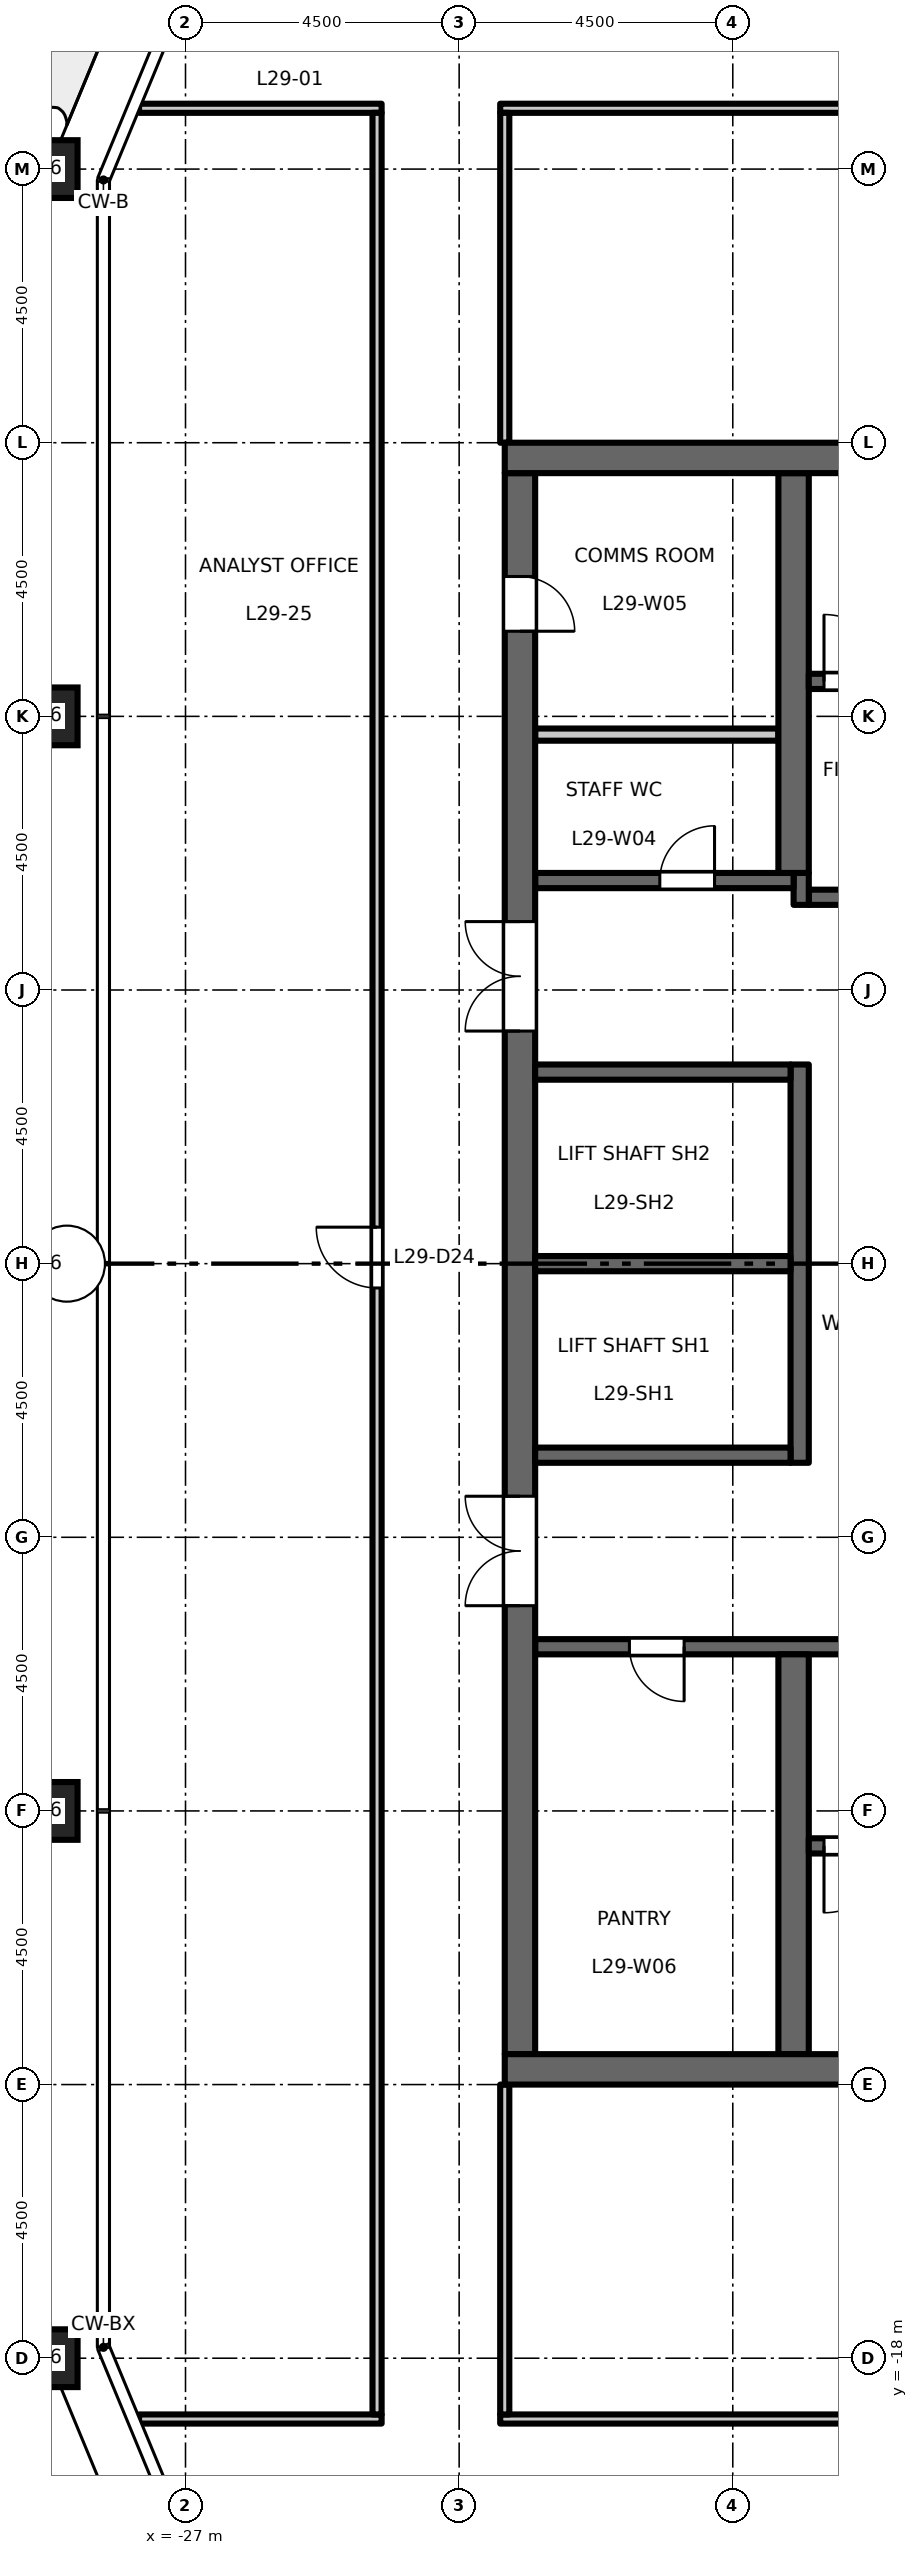
"""IFC4 building model, lengths in metres.
Left out: names, types, materials, properties, quantities, classifications, styles, units other than length and angle.
Written with IfcOpenShell. Run it as: python <this file> out.ifc"""

import sys

from ifc_helpers import new_model, si_unit, direction, frame, frame_2d, origin, origin_2d, place, context, subcontext, project, spatial, rectangle, hollow_rectangle, extrude, element, fill, save


model = new_model("IFC4")
c1 = context("Model", 3, precision=1e-05, world=origin(), true_north=direction((0.0, 1.0)))
c2 = subcontext(c1, "Body", "Model", "MODEL_VIEW")
j1 = project(units=[si_unit("LENGTHUNIT", "METRE"), si_unit("PLANEANGLEUNIT", "RADIAN")], contexts=[c1])
p1 = place(None, origin())
s1 = spatial("IfcSite", under=j1, at=p1, CompositionType="ELEMENT")
p2 = place(p1, origin())
s2 = spatial("IfcBuilding", under=s1, at=p2, CompositionType="ELEMENT")
p3 = place(p2, frame((0.0, 0.0, 136.2)))
s3 = spatial("IfcBuildingStorey", under=s2, at=p3, CompositionType="ELEMENT", Elevation=136.2)
for number, where, z_axis, x_axis in (
    (1, (-29.25, 18.0, 0.0), (0.0, 0.0, 1.0), (1.0, 0.0, 0.0)),
    (2, (-29.25, 9.0, 0.0), (0.0, 0.0, 1.0), (1.0, 0.0, 0.0)),
    (3, (-29.25, 0.0, 0.0), (0.0, 0.0, 1.0), (1.0, 0.0, 0.0)),
    (4, (-29.25, -9.0, 0.0), (0.0, 0.0, 1.0), (1.0, 0.0, 0.0)),
    (5, (-29.25, -18.0, 0.0), (0.0, 0.0, 1.0), (1.0, 0.0, 0.0)),
):
    element("IfcColumn", number, at=place(p3, frame(where, z_axis=z_axis, x_axis=x_axis)), inside=s3, PredefinedType="COLUMN", context=c2, shape_type="SweptSolid", body=[
        extrude(hollow_rectangle(XDim=0.95, YDim=0.95, WallThickness=0.055, at=origin_2d()), origin(), (0.0, 0.0, 1.0), 4.5),
    ])
p4 = place(p3, frame((-12.15, 6.025, 0.0), z_axis=(0.0, 0.0, 1.0), x_axis=(-1.0, 0.0, 0.0)))
e6 = element("IfcWall", 6, at=p4, inside=s3, PredefinedType="SHEAR", context=c2, shape_type="SweptSolid", body=[
    extrude(rectangle(XDim=4.6, YDim=0.25, at=frame_2d((2.3, 0.0))), origin(), (0.0, 0.0, 1.0), 4.35),
])
p5 = place(p4, frame((1.8, 0.0, 0.0)))
e7 = element("IfcOpeningElement", 7, at=p5, cuts=e6, PredefinedType="OPENING", context=c2, shape_type="SweptSolid", body=[
    extrude(rectangle(XDim=1.0, YDim=2.1, at=frame_2d((0.5, 1.05))), frame((0.0, 0.135, 0.0), z_axis=(0.0, -1.0, 0.0), x_axis=(1.0, 0.0, 0.0)), (0.0, 0.0, 1.0), 0.27),
])
p6 = place(p3, frame((-16.875, 5.9, 0.0), z_axis=(0.0, 0.0, 1.0), x_axis=(0.0, 1.0, 0.0)))
e8 = element("IfcWall", 8, at=p6, inside=s3, PredefinedType="SHEAR", context=c2, shape_type="SweptSolid", body=[
    extrude(rectangle(XDim=0.525, YDim=0.25, at=frame_2d((0.263, 0.0))), origin(), (0.0, 0.0, 1.0), 4.35),
])
p7 = place(p3, frame((-17.0, 6.3, 0.0), z_axis=(0.0, 0.0, 1.0), x_axis=(-1.0, 0.0, 0.0)))
e9 = element("IfcWall", 9, at=p7, inside=s3, PredefinedType="SHEAR", context=c2, shape_type="SweptSolid", body=[
    extrude(rectangle(XDim=4.25, YDim=0.25, at=frame_2d((2.125, 0.0))), origin(), (0.0, 0.0, 1.0), 4.35),
])
p8 = place(p7, frame((1.3, 0.0, 0.0)))
e10 = element("IfcOpeningElement", 10, at=p8, cuts=e9, PredefinedType="OPENING", context=c2, shape_type="SweptSolid", body=[
    extrude(rectangle(XDim=0.9, YDim=2.1, at=frame_2d((0.45, 1.05))), frame((0.0, 0.135, 0.0), z_axis=(0.0, -1.0, 0.0), x_axis=(1.0, 0.0, 0.0)), (0.0, 0.0, 1.0), 0.27),
])
p9 = place(p3, frame((-12.15, -6.3, 0.0), z_axis=(0.0, 0.0, 1.0), x_axis=(-1.0, 0.0, 0.0)))
e11 = element("IfcWall", 11, at=p9, inside=s3, PredefinedType="SHEAR", context=c2, shape_type="SweptSolid", body=[
    extrude(rectangle(XDim=9.1, YDim=0.25, at=frame_2d((4.55, 0.0))), origin(), (0.0, 0.0, 1.0), 4.35),
])
p10 = place(p9, frame((1.8, 0.0, 0.0)))
e12 = element("IfcOpeningElement", 12, at=p10, cuts=e11, PredefinedType="OPENING", context=c2, shape_type="SweptSolid", body=[
    extrude(rectangle(XDim=1.0, YDim=2.1, at=frame_2d((0.5, 1.05))), frame((0.0, 0.135, 0.0), z_axis=(0.0, -1.0, 0.0), x_axis=(1.0, 0.0, 0.0)), (0.0, 0.0, 1.0), 0.27),
])
p11 = place(p9, frame((6.65, 0.0, 0.0)))
e13 = element("IfcOpeningElement", 13, at=p11, cuts=e11, PredefinedType="OPENING", context=c2, shape_type="SweptSolid", body=[
    extrude(rectangle(XDim=0.9, YDim=2.1, at=frame_2d((0.45, 1.05))), frame((0.0, 0.135, 0.0), z_axis=(0.0, -1.0, 0.0), x_axis=(1.0, 0.0, 0.0)), (0.0, 0.0, 1.0), 0.27),
])
p12 = place(p3, frame((-21.5, -13.0, 0.0), z_axis=(0.0, 0.0, 1.0), x_axis=(0.0, 1.0, 0.0)))
e14 = element("IfcWall", 14, at=p12, inside=s3, PredefinedType="SHEAR", context=c2, shape_type="SweptSolid", body=[
    extrude(rectangle(XDim=26.0, YDim=0.5, at=frame_2d((13.0, 0.0))), origin(), (0.0, 0.0, 1.0), 4.35),
])
p13 = place(p12, frame((16.825, 0.0, 0.0)))
e15 = element("IfcOpeningElement", 15, at=p13, cuts=e14, PredefinedType="OPENING", context=c2, shape_type="SweptSolid", body=[
    extrude(rectangle(XDim=1.8, YDim=2.1, at=frame_2d((0.9, 1.05))), frame((0.0, 0.26, 0.0), z_axis=(0.0, -1.0, 0.0), x_axis=(1.0, 0.0, 0.0)), (0.0, 0.0, 1.0), 0.52),
])
p14 = place(p12, frame((7.375, 0.0, 0.0)))
e16 = element("IfcOpeningElement", 16, at=p14, cuts=e14, PredefinedType="OPENING", context=c2, shape_type="SweptSolid", body=[
    extrude(rectangle(XDim=1.8, YDim=2.1, at=frame_2d((0.9, 1.05))), frame((0.0, 0.26, 0.0), z_axis=(0.0, -1.0, 0.0), x_axis=(1.0, 0.0, 0.0)), (0.0, 0.0, 1.0), 0.52),
])
p15 = place(p12, frame((23.4, 0.0, 0.0)))
e17 = element("IfcOpeningElement", 17, at=p15, cuts=e14, PredefinedType="OPENING", context=c2, shape_type="SweptSolid", body=[
    extrude(rectangle(XDim=0.9, YDim=2.1, at=frame_2d((0.45, 1.05))), frame((0.0, 0.26, 0.0), z_axis=(0.0, -1.0, 0.0), x_axis=(1.0, 0.0, 0.0)), (0.0, 0.0, 1.0), 0.52),
])
p16 = place(p3, frame((-17.25, 8.7, 0.0), z_axis=(0.0, 0.0, 1.0), x_axis=(-1.0, 0.0, 0.0)))
e18 = element("IfcWall", 18, at=p16, inside=s3, PredefinedType="PARTITIONING", context=c2, shape_type="SweptSolid", body=[
    extrude(rectangle(XDim=4.0, YDim=0.2, at=frame_2d((2.0, 0.0))), origin(), (0.0, 0.0, 1.0), 4.35),
])
p17 = place(p3, frame((-16.9, -3.275, 0.0), z_axis=(0.0, 0.0, 1.0), x_axis=(0.0, 1.0, 0.0)))
e19 = element("IfcWall", 19, at=p17, inside=s3, PredefinedType="SHEAR", context=c2, shape_type="SweptSolid", body=[
    extrude(rectangle(XDim=6.55, YDim=0.3, at=frame_2d((3.275, 0.0))), origin(), (0.0, 0.0, 1.0), 4.35),
])
for number, where, z_axis, x_axis in (
    (20, (-17.05, 0.0, 0.0), (0.0, 0.0, 1.0), (-1.0, 0.0, 0.0)),
    (21, (-17.05, 3.15, 0.0), (0.0, 0.0, 1.0), (-1.0, 0.0, 0.0)),
    (22, (-17.05, -3.15, 0.0), (0.0, 0.0, 1.0), (-1.0, 0.0, 0.0)),
):
    element("IfcWall", number, at=place(p3, frame(where, z_axis=z_axis, x_axis=x_axis)), inside=s3, PredefinedType="SHEAR", context=c2, shape_type="SweptSolid", body=[
        extrude(rectangle(XDim=4.2, YDim=0.25, at=frame_2d((2.1, 0.0))), origin(), (0.0, 0.0, 1.0), 4.35),
    ])
for number, where, z_axis, x_axis in (
    (23, (-17.0, 6.425, 0.0), (0.0, 0.0, 1.0), (0.0, 1.0, 0.0)),
    (24, (-17.0, -13.0, 0.0), (0.0, 0.0, 1.0), (0.0, 1.0, 0.0)),
):
    element("IfcWall", number, at=place(p3, frame(where, z_axis=z_axis, x_axis=x_axis)), inside=s3, PredefinedType="SHEAR", context=c2, shape_type="SweptSolid", body=[
        extrude(rectangle(XDim=6.575, YDim=0.5, at=frame_2d((3.288, 0.0))), origin(), (0.0, 0.0, 1.0), 4.35),
    ])
p18 = place(p3, frame((-8.75, 9.575, 0.0), z_axis=(0.0, 0.0, 1.0), x_axis=(-1.0, 0.0, 0.0)))
e25 = element("IfcWall", 25, at=p18, inside=s3, PredefinedType="SHEAR", context=c2, shape_type="SweptSolid", body=[
    extrude(rectangle(XDim=8.0, YDim=0.25, at=frame_2d((4.0, 0.0))), origin(), (0.0, 0.0, 1.0), 4.35),
])
p19 = place(p18, frame((6.65, 0.0, 0.0)))
e26 = element("IfcOpeningElement", 26, at=p19, cuts=e25, PredefinedType="OPENING", context=c2, shape_type="SweptSolid", body=[
    extrude(rectangle(XDim=1.1, YDim=2.1, at=frame_2d((0.55, 1.05))), frame((0.0, 0.135, 0.0), z_axis=(0.0, -1.0, 0.0), x_axis=(1.0, 0.0, 0.0)), (0.0, 0.0, 1.0), 0.27),
])
p20 = place(p3, frame((-8.75, -9.575, 0.0), z_axis=(0.0, 0.0, 1.0), x_axis=(-1.0, 0.0, 0.0)))
e27 = element("IfcWall", 27, at=p20, inside=s3, PredefinedType="SHEAR", context=c2, shape_type="SweptSolid", body=[
    extrude(rectangle(XDim=8.0, YDim=0.25, at=frame_2d((4.0, 0.0))), origin(), (0.0, 0.0, 1.0), 4.35),
])
p21 = place(p20, frame((6.65, 0.0, 0.0)))
e28 = element("IfcOpeningElement", 28, at=p21, cuts=e27, PredefinedType="OPENING", context=c2, shape_type="SweptSolid", body=[
    extrude(rectangle(XDim=1.1, YDim=2.1, at=frame_2d((0.55, 1.05))), frame((0.0, 0.135, 0.0), z_axis=(0.0, -1.0, 0.0), x_axis=(1.0, 0.0, 0.0)), (0.0, 0.0, 1.0), 0.27),
])
for number, where, z_axis, x_axis in (
    (29, (-8.25, 13.25, 0.0), (0.0, 0.0, 1.0), (-1.0, 0.0, 0.0)),
    (30, (-8.25, -13.25, 0.0), (0.0, 0.0, 1.0), (-1.0, 0.0, 0.0)),
):
    element("IfcWall", number, at=place(p3, frame(where, z_axis=z_axis, x_axis=x_axis)), inside=s3, PredefinedType="SHEAR", context=c2, shape_type="SweptSolid", body=[
        extrude(rectangle(XDim=13.5, YDim=0.5, at=frame_2d((6.75, 0.0))), origin(), (0.0, 0.0, 1.0), 4.35),
    ])
p22 = place(p3, frame((-27.764, -19.0, 0.0), z_axis=(0.0, 0.0, 1.0), x_axis=(1.0, 0.0, 0.0)))
e31 = element("IfcWall", 31, at=p22, inside=s3, PredefinedType="PARTITIONING", context=c2, shape_type="SweptSolid", body=[
    extrude(rectangle(XDim=3.989, YDim=0.15, at=frame_2d((1.995, 0.0))), origin(), (0.0, 0.0, 1.0), 4.35),
])
p23 = place(p3, frame((-21.825, -19.0, 0.0), z_axis=(0.0, 0.0, 1.0), x_axis=(1.0, 0.0, 0.0)))
e32 = element("IfcWall", 32, at=p23, inside=s3, PredefinedType="PARTITIONING", context=c2, shape_type="SweptSolid", body=[
    extrude(rectangle(XDim=43.65, YDim=0.15, at=frame_2d((21.825, 0.0))), origin(), (0.0, 0.0, 1.0), 4.35),
])
p24 = place(p23, frame((21.425, 0.0, 0.0)))
e33 = element("IfcOpeningElement", 33, at=p24, cuts=e32, PredefinedType="OPENING", context=c2, shape_type="SweptSolid", body=[
    extrude(rectangle(XDim=1.0, YDim=2.1, at=frame_2d((0.5, 1.05))), frame((0.0, 0.085, 0.0), z_axis=(0.0, -1.0, 0.0), x_axis=(1.0, 0.0, 0.0)), (0.0, 0.0, 1.0), 0.17),
])
p25 = place(p23, frame((6.425, 0.0, 0.0)))
e34 = element("IfcOpeningElement", 34, at=p25, cuts=e32, PredefinedType="OPENING", context=c2, shape_type="SweptSolid", body=[
    extrude(rectangle(XDim=1.0, YDim=2.1, at=frame_2d((0.5, 1.05))), frame((0.0, 0.085, 0.0), z_axis=(0.0, -1.0, 0.0), x_axis=(1.0, 0.0, 0.0)), (0.0, 0.0, 1.0), 0.17),
])
p26 = place(p23, frame((36.425, 0.0, 0.0)))
e35 = element("IfcOpeningElement", 35, at=p26, cuts=e32, PredefinedType="OPENING", context=c2, shape_type="SweptSolid", body=[
    extrude(rectangle(XDim=1.0, YDim=2.1, at=frame_2d((0.5, 1.05))), frame((0.0, 0.085, 0.0), z_axis=(0.0, -1.0, 0.0), x_axis=(1.0, 0.0, 0.0)), (0.0, 0.0, 1.0), 0.17),
])
p27 = place(p3, frame((-27.764, 19.0, 0.0), z_axis=(0.0, 0.0, 1.0), x_axis=(1.0, 0.0, 0.0)))
e36 = element("IfcWall", 36, at=p27, inside=s3, PredefinedType="PARTITIONING", context=c2, shape_type="SweptSolid", body=[
    extrude(rectangle(XDim=3.989, YDim=0.15, at=frame_2d((1.995, 0.0))), origin(), (0.0, 0.0, 1.0), 4.35),
])
p28 = place(p3, frame((-21.825, 19.0, 0.0), z_axis=(0.0, 0.0, 1.0), x_axis=(1.0, 0.0, 0.0)))
e37 = element("IfcWall", 37, at=p28, inside=s3, PredefinedType="PARTITIONING", context=c2, shape_type="SweptSolid", body=[
    extrude(rectangle(XDim=43.65, YDim=0.15, at=frame_2d((21.825, 0.0))), origin(), (0.0, 0.0, 1.0), 4.35),
])
p29 = place(p28, frame((17.225, 0.0, 0.0)))
e38 = element("IfcOpeningElement", 38, at=p29, cuts=e37, PredefinedType="OPENING", context=c2, shape_type="SweptSolid", body=[
    extrude(rectangle(XDim=1.0, YDim=2.1, at=frame_2d((0.5, 1.05))), frame((0.0, 0.085, 0.0), z_axis=(0.0, -1.0, 0.0), x_axis=(1.0, 0.0, 0.0)), (0.0, 0.0, 1.0), 0.17),
])
p30 = place(p28, frame((25.475, 0.0, 0.0)))
e39 = element("IfcOpeningElement", 39, at=p30, cuts=e37, PredefinedType="OPENING", context=c2, shape_type="SweptSolid", body=[
    extrude(rectangle(XDim=1.0, YDim=2.1, at=frame_2d((0.5, 1.05))), frame((0.0, 0.085, 0.0), z_axis=(0.0, -1.0, 0.0), x_axis=(1.0, 0.0, 0.0)), (0.0, 0.0, 1.0), 0.17),
])
p31 = place(p28, frame((6.225, 0.0, 0.0)))
e40 = element("IfcOpeningElement", 40, at=p31, cuts=e37, PredefinedType="OPENING", context=c2, shape_type="SweptSolid", body=[
    extrude(rectangle(XDim=1.0, YDim=2.1, at=frame_2d((0.5, 1.05))), frame((0.0, 0.085, 0.0), z_axis=(0.0, -1.0, 0.0), x_axis=(1.0, 0.0, 0.0)), (0.0, 0.0, 1.0), 0.17),
])
p32 = place(p28, frame((36.225, 0.0, 0.0)))
e41 = element("IfcOpeningElement", 41, at=p32, cuts=e37, PredefinedType="OPENING", context=c2, shape_type="SweptSolid", body=[
    extrude(rectangle(XDim=1.0, YDim=2.1, at=frame_2d((0.5, 1.05))), frame((0.0, 0.085, 0.0), z_axis=(0.0, -1.0, 0.0), x_axis=(1.0, 0.0, 0.0)), (0.0, 0.0, 1.0), 0.17),
])
p33 = place(p3, frame((-23.85, -18.925, 0.0), z_axis=(0.0, 0.0, 1.0), x_axis=(0.0, 1.0, 0.0)))
e42 = element("IfcWall", 42, at=p33, inside=s3, PredefinedType="PARTITIONING", context=c2, shape_type="SweptSolid", body=[
    extrude(rectangle(XDim=37.85, YDim=0.15, at=frame_2d((18.925, 0.0))), origin(), (0.0, 0.0, 1.0), 4.35),
])
p34 = place(p33, frame((18.525, 0.0, 0.0)))
e43 = element("IfcOpeningElement", 43, at=p34, cuts=e42, PredefinedType="OPENING", context=c2, shape_type="SweptSolid", body=[
    extrude(rectangle(XDim=1.0, YDim=2.1, at=frame_2d((0.5, 1.05))), frame((0.0, 0.085, 0.0), z_axis=(0.0, -1.0, 0.0), x_axis=(1.0, 0.0, 0.0)), (0.0, 0.0, 1.0), 0.17),
])
for number, where, z_axis, x_axis in (
    (44, (-21.75, -18.925, 0.0), (0.0, 0.0, 1.0), (0.0, 1.0, 0.0)),
    (45, (-21.75, 13.5, 0.0), (0.0, 0.0, 1.0), (0.0, 1.0, 0.0)),
):
    element("IfcWall", number, at=place(p3, frame(where, z_axis=z_axis, x_axis=x_axis)), inside=s3, PredefinedType="PARTITIONING", context=c2, shape_type="SweptSolid", body=[
        extrude(rectangle(XDim=5.425, YDim=0.15, at=frame_2d((2.712, 0.0))), origin(), (0.0, 0.0, 1.0), 4.35),
    ])
p35 = place(p19, origin())
e46 = element("IfcDoor", 46, at=p35, inside=s3, OperationType="SINGLE_SWING_RIGHT", PredefinedType="DOOR", context=c2, shape_type="SweptSolid", body=[
    extrude(rectangle(XDim=1.1, YDim=2.1, at=frame_2d((0.55, 1.05))), frame((0.0, 0.025, 0.0), z_axis=(0.0, -1.0, 0.0), x_axis=(1.0, 0.0, 0.0)), (0.0, 0.0, 1.0), 0.05),
])
fill(e26, e46)
p36 = place(p21, origin())
e47 = element("IfcDoor", 47, at=p36, inside=s3, OperationType="SINGLE_SWING_LEFT", PredefinedType="DOOR", context=c2, shape_type="SweptSolid", body=[
    extrude(rectangle(XDim=1.1, YDim=2.1, at=frame_2d((0.55, 1.05))), frame((0.0, 0.025, 0.0), z_axis=(0.0, -1.0, 0.0), x_axis=(1.0, 0.0, 0.0)), (0.0, 0.0, 1.0), 0.05),
])
fill(e28, e47)
p37 = place(p13, origin())
e48 = element("IfcDoor", 48, at=p37, inside=s3, OperationType="DOUBLE_DOOR_DOUBLE_SWING", PredefinedType="DOOR", context=c2, shape_type="SweptSolid", body=[
    extrude(rectangle(XDim=1.8, YDim=2.1, at=frame_2d((0.9, 1.05))), frame((0.0, 0.025, 0.0), z_axis=(0.0, -1.0, 0.0), x_axis=(1.0, 0.0, 0.0)), (0.0, 0.0, 1.0), 0.05),
])
fill(e15, e48)
p38 = place(p14, origin())
e49 = element("IfcDoor", 49, at=p38, inside=s3, OperationType="DOUBLE_DOOR_DOUBLE_SWING", PredefinedType="DOOR", context=c2, shape_type="SweptSolid", body=[
    extrude(rectangle(XDim=1.8, YDim=2.1, at=frame_2d((0.9, 1.05))), frame((0.0, 0.025, 0.0), z_axis=(0.0, -1.0, 0.0), x_axis=(1.0, 0.0, 0.0)), (0.0, 0.0, 1.0), 0.05),
])
fill(e16, e49)
p39 = place(p8, origin())
e50 = element("IfcDoor", 50, at=p39, inside=s3, OperationType="SINGLE_SWING_LEFT", PredefinedType="DOOR", context=c2, shape_type="SweptSolid", body=[
    extrude(rectangle(XDim=0.9, YDim=2.1, at=frame_2d((0.45, 1.05))), frame((0.0, 0.025, 0.0), z_axis=(0.0, -1.0, 0.0), x_axis=(1.0, 0.0, 0.0)), (0.0, 0.0, 1.0), 0.05),
])
fill(e10, e50)
p40 = place(p15, origin())
e51 = element("IfcDoor", 51, at=p40, inside=s3, OperationType="SINGLE_SWING_LEFT", PredefinedType="DOOR", context=c2, shape_type="SweptSolid", body=[
    extrude(rectangle(XDim=0.9, YDim=2.1, at=frame_2d((0.45, 1.05))), frame((0.0, 0.025, 0.0), z_axis=(0.0, -1.0, 0.0), x_axis=(1.0, 0.0, 0.0)), (0.0, 0.0, 1.0), 0.05),
])
fill(e17, e51)
p41 = place(p11, origin())
e52 = element("IfcDoor", 52, at=p41, inside=s3, OperationType="SINGLE_SWING_RIGHT", PredefinedType="DOOR", context=c2, shape_type="SweptSolid", body=[
    extrude(rectangle(XDim=0.9, YDim=2.1, at=frame_2d((0.45, 1.05))), frame((0.0, 0.025, 0.0), z_axis=(0.0, -1.0, 0.0), x_axis=(1.0, 0.0, 0.0)), (0.0, 0.0, 1.0), 0.05),
])
fill(e13, e52)
p42 = place(p34, origin())
e53 = element("IfcDoor", 53, at=p42, inside=s3, OperationType="SINGLE_SWING_RIGHT", PredefinedType="DOOR", context=c2, shape_type="SweptSolid", body=[
    extrude(rectangle(XDim=1.0, YDim=2.1, at=frame_2d((0.5, 1.05))), frame((0.0, 0.025, 0.0), z_axis=(0.0, -1.0, 0.0), x_axis=(1.0, 0.0, 0.0)), (0.0, 0.0, 1.0), 0.05),
])
fill(e43, e53)
save(model, sys.argv[1])
